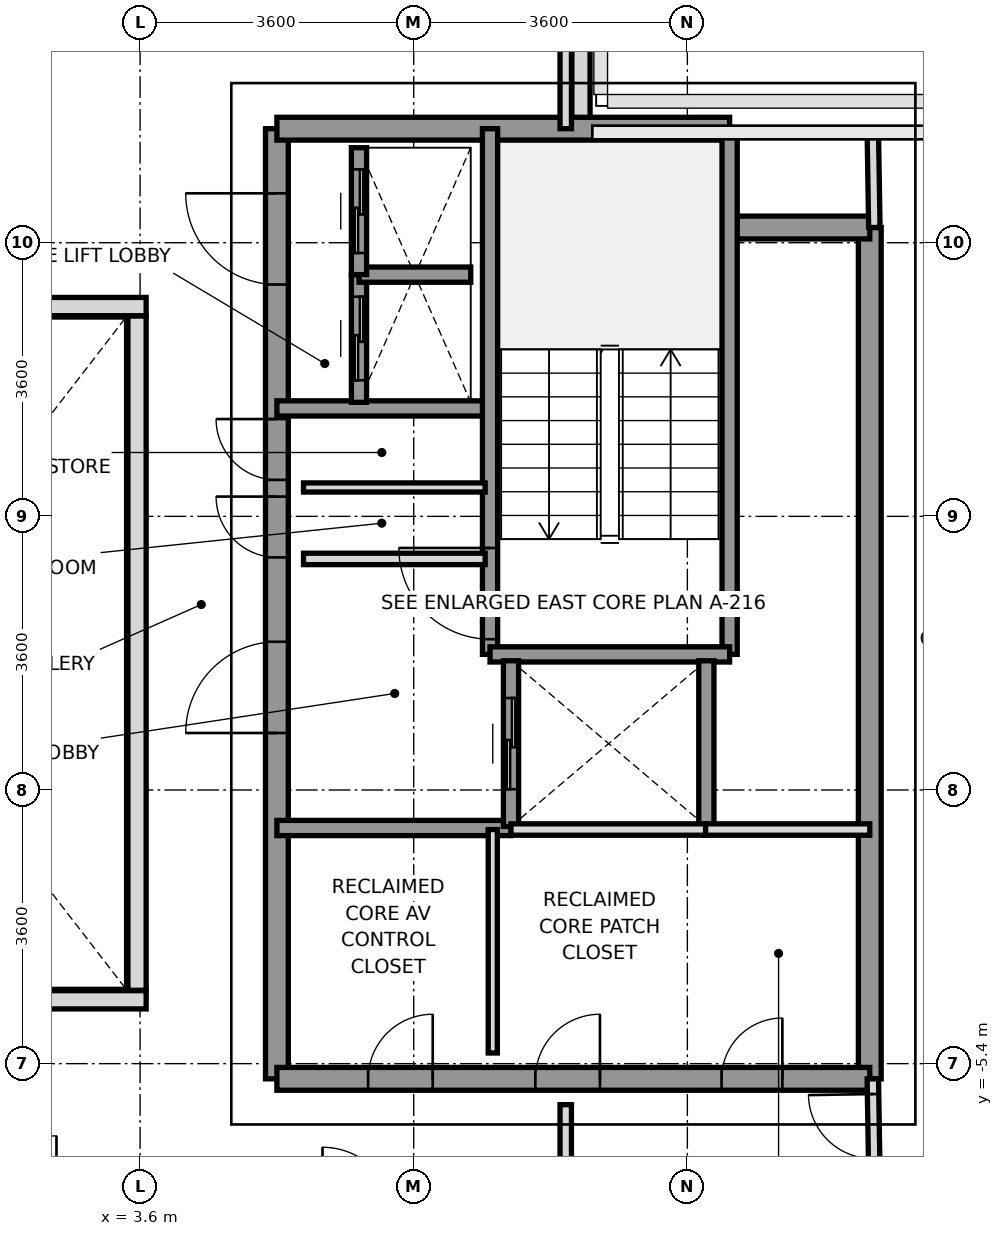
"""IFC4 building model, lengths in metres.
Left out: names, types, materials, properties, quantities, classifications, styles, units other than length and angle.
Written with IfcOpenShell. Run it as: python <this file> out.ifc"""

import sys

from ifc_helpers import new_model, si_unit, direction, frame, frame_2d, origin, place, context, subcontext, project, spatial, rectangle, extrude, source, transform, mapped, element, fill, save


model = new_model("IFC4")
c1 = context("Model", 3, precision=1e-05, world=origin(), true_north=direction((0.0, 1.0)))
c2 = subcontext(c1, "Body", "Model", "MODEL_VIEW")
j1 = project(units=[si_unit("LENGTHUNIT", "METRE"), si_unit("PLANEANGLEUNIT", "RADIAN")], contexts=[c1])
p1 = place(None, origin())
s1 = spatial("IfcSite", under=j1, at=p1, CompositionType="ELEMENT")
p2 = place(p1, origin())
s2 = spatial("IfcBuilding", under=s1, at=p2, CompositionType="ELEMENT")
p3 = place(p2, frame((0.0, 0.0, 230.0)))
s3 = spatial("IfcBuildingStorey", under=s2, at=p3, CompositionType="ELEMENT", Elevation=230.0)
p4 = place(p3, frame((9.4, 8.622, 0.0), z_axis=(0.0, 0.0, 1.0), x_axis=(0.0, -1.0, 0.0)))
e1 = element("IfcWall", 1, at=p4, inside=s3, PredefinedType="PARAPET", context=c2, shape_type="SweptSolid", body=[
    extrude(rectangle(XDim=1.669, YDim=0.24, at=frame_2d((0.834, 0.0))), origin(), (0.0, 0.0, 1.0), 1.15),
])
p5 = place(p3, frame((13.2, -5.6, 0.0), z_axis=(0.0, 0.0, 1.0), x_axis=(0.0, 1.0, 0.0)))
e2 = element("IfcWall", 2, at=p5, inside=s3, PredefinedType="SHEAR", context=c2, shape_type="SweptSolid", body=[
    extrude(rectangle(XDim=11.2, YDim=0.3, at=frame_2d((5.6, 0.0))), origin(), (0.0, 0.0, 1.0), 3.01),
])
p6 = place(p3, frame((5.4, -5.6, 0.0), z_axis=(0.0, 0.0, 1.0), x_axis=(0.0, 1.0, 0.0)))
e3 = element("IfcWall", 3, at=p6, inside=s3, PredefinedType="SHEAR", context=c2, shape_type="SweptSolid", body=[
    extrude(rectangle(XDim=12.5, YDim=0.3, at=frame_2d((6.25, 0.0))), origin(), (0.0, 0.0, 1.0), 3.01),
])
p7 = place(p6, frame((4.55, 0.0, 0.0)))
e4 = element("IfcOpeningElement", 4, at=p7, cuts=e3, PredefinedType="OPENING", context=c2, shape_type="SweptSolid", body=[
    extrude(rectangle(XDim=1.2, YDim=2.2, at=frame_2d((0.6, 1.1))), frame((0.0, 0.16, 0.0), z_axis=(0.0, -1.0, 0.0), x_axis=(1.0, 0.0, 0.0)), (0.0, 0.0, 1.0), 0.32),
])
p8 = place(p6, frame((10.45, 0.0, 0.0)))
e5 = element("IfcOpeningElement", 5, at=p8, cuts=e3, PredefinedType="OPENING", context=c2, shape_type="SweptSolid", body=[
    extrude(rectangle(XDim=1.2, YDim=2.2, at=frame_2d((0.6, 1.1))), frame((0.0, 0.16, 0.0), z_axis=(0.0, -1.0, 0.0), x_axis=(1.0, 0.0, 0.0)), (0.0, 0.0, 1.0), 0.32),
])
p9 = place(p6, frame((6.86, 0.0, 0.0)))
e6 = element("IfcOpeningElement", 6, at=p9, cuts=e3, PredefinedType="OPENING", context=c2, shape_type="SweptSolid", body=[
    extrude(rectangle(XDim=0.8, YDim=2.1, at=frame_2d((0.4, 1.05))), frame((0.0, 0.16, 0.0), z_axis=(0.0, -1.0, 0.0), x_axis=(1.0, 0.0, 0.0)), (0.0, 0.0, 1.0), 0.32),
])
p10 = place(p6, frame((7.88, 0.0, 0.0)))
e7 = element("IfcOpeningElement", 7, at=p10, cuts=e3, PredefinedType="OPENING", context=c2, shape_type="SweptSolid", body=[
    extrude(rectangle(XDim=0.8, YDim=2.1, at=frame_2d((0.4, 1.05))), frame((0.0, 0.16, 0.0), z_axis=(0.0, -1.0, 0.0), x_axis=(1.0, 0.0, 0.0)), (0.0, 0.0, 1.0), 0.32),
])
p11 = place(p3, frame((5.4, 6.9, 0.0), z_axis=(0.0, 0.0, 1.0), x_axis=(1.0, 0.0, 0.0)))
e8 = element("IfcWall", 8, at=p11, inside=s3, PredefinedType="SHEAR", context=c2, shape_type="SweptSolid", body=[
    extrude(rectangle(XDim=5.956, YDim=0.3, at=frame_2d((2.978, 0.0))), origin(), (0.0, 0.0, 1.0), 3.01),
])
p12 = place(p3, frame((11.356, 5.6, 0.0), z_axis=(0.0, 0.0, 1.0), x_axis=(1.0, 0.0, 0.0)))
e9 = element("IfcWall", 9, at=p12, inside=s3, PredefinedType="SHEAR", context=c2, shape_type="SweptSolid", body=[
    extrude(rectangle(XDim=1.844, YDim=0.3, at=frame_2d((0.922, 0.0))), origin(), (0.0, 0.0, 1.0), 3.01),
])
p13 = place(p3, frame((5.4, -5.6, 0.0), z_axis=(0.0, 0.0, 1.0), x_axis=(1.0, 0.0, 0.0)))
e10 = element("IfcWall", 10, at=p13, inside=s3, PredefinedType="SHEAR", context=c2, shape_type="SweptSolid", body=[
    extrude(rectangle(XDim=7.8, YDim=0.3, at=frame_2d((3.9, 0.0))), origin(), (0.0, 0.0, 1.0), 3.01),
])
p14 = place(p13, frame((5.85, 0.0, 0.0)))
e11 = element("IfcOpeningElement", 11, at=p14, cuts=e10, PredefinedType="OPENING", context=c2, shape_type="SweptSolid", body=[
    extrude(rectangle(XDim=0.8, YDim=2.1, at=frame_2d((0.4, 1.05))), frame((0.0, 0.16, 0.0), z_axis=(0.0, -1.0, 0.0), x_axis=(1.0, 0.0, 0.0)), (0.0, 0.0, 1.0), 0.32),
])
p15 = place(p13, frame((1.2, 0.0, 0.0)))
e12 = element("IfcOpeningElement", 12, at=p15, cuts=e10, PredefinedType="OPENING", context=c2, shape_type="SweptSolid", body=[
    extrude(rectangle(XDim=0.85, YDim=2.1, at=frame_2d((0.425, 1.05))), frame((0.0, 0.16, 0.0), z_axis=(0.0, -1.0, 0.0), x_axis=(1.0, 0.0, 0.0)), (0.0, 0.0, 1.0), 0.32),
])
p16 = place(p13, frame((3.4, 0.0, 0.0)))
e13 = element("IfcOpeningElement", 13, at=p16, cuts=e10, PredefinedType="OPENING", context=c2, shape_type="SweptSolid", body=[
    extrude(rectangle(XDim=0.85, YDim=2.1, at=frame_2d((0.425, 1.05))), frame((0.0, 0.16, 0.0), z_axis=(0.0, -1.0, 0.0), x_axis=(1.0, 0.0, 0.0)), (0.0, 0.0, 1.0), 0.32),
])
p17 = place(p3, frame((5.4, 3.22, 0.0), z_axis=(0.0, 0.0, 1.0), x_axis=(1.0, 0.0, 0.0)))
e14 = element("IfcWall", 14, at=p17, inside=s3, PredefinedType="SOLIDWALL", context=c2, shape_type="SweptSolid", body=[
    extrude(rectangle(XDim=2.78, YDim=0.2, at=frame_2d((1.39, 0.0))), origin(), (0.0, 0.0, 1.0), 3.01),
])
p18 = place(p3, frame((5.4, -2.3, 0.0), z_axis=(0.0, 0.0, 1.0), x_axis=(1.0, 0.0, 0.0)))
e15 = element("IfcWall", 15, at=p18, inside=s3, PredefinedType="SOLIDWALL", context=c2, shape_type="SweptSolid", body=[
    extrude(rectangle(XDim=3.08, YDim=0.2, at=frame_2d((1.54, 0.0))), origin(), (0.0, 0.0, 1.0), 3.01),
])
p19 = place(p3, frame((8.204, -0.016, 0.0), z_axis=(0.0, 0.0, 1.0), x_axis=(0.0, 1.0, 0.0)))
e16 = element("IfcWall", 16, at=p19, inside=s3, PredefinedType="SOLIDWALL", context=c2, shape_type="SweptSolid", body=[
    extrude(rectangle(XDim=6.916, YDim=0.2, at=frame_2d((3.458, 0.0))), origin(), (0.0, 0.0, 1.0), 3.01),
])
p20 = place(p19, frame((0.2, 0.0, 0.0)))
e17 = element("IfcOpeningElement", 17, at=p20, cuts=e16, PredefinedType="OPENING", context=c2, shape_type="SweptSolid", body=[
    extrude(rectangle(XDim=1.2, YDim=2.2, at=frame_2d((0.6, 1.1))), frame((0.0, 0.11, 0.0), z_axis=(0.0, -1.0, 0.0), x_axis=(1.0, 0.0, 0.0)), (0.0, 0.0, 1.0), 0.22),
])
p21 = place(p3, frame((11.356, -0.016, 0.0), z_axis=(0.0, 0.0, 1.0), x_axis=(0.0, 1.0, 0.0)))
e18 = element("IfcWall", 18, at=p21, inside=s3, PredefinedType="SOLIDWALL", context=c2, shape_type="SweptSolid", body=[
    extrude(rectangle(XDim=6.916, YDim=0.2, at=frame_2d((3.458, 0.0))), origin(), (0.0, 0.0, 1.0), 3.01),
])
p22 = place(p3, frame((8.204, -0.016, 0.0), z_axis=(0.0, 0.0, 1.0), x_axis=(1.0, 0.0, 0.0)))
e19 = element("IfcWall", 19, at=p22, inside=s3, PredefinedType="SOLIDWALL", context=c2, shape_type="SweptSolid", body=[
    extrude(rectangle(XDim=3.152, YDim=0.2, at=frame_2d((1.576, 0.0))), origin(), (0.0, 0.0, 1.0), 3.01),
])
p23 = place(p3, frame((8.48, -2.28, 0.0), z_axis=(0.0, 0.0, 1.0), x_axis=(0.0, 1.0, 0.0)))
e20 = element("IfcWall", 20, at=p23, inside=s3, PredefinedType="SOLIDWALL", context=c2, shape_type="SweptSolid", body=[
    extrude(rectangle(XDim=2.18, YDim=0.2, at=frame_2d((1.09, 0.0))), origin(), (0.0, 0.0, 1.0), 3.01),
])
p24 = place(p23, frame((0.49, 0.0, 0.0)))
e21 = element("IfcOpeningElement", 21, at=p24, cuts=e20, PredefinedType="OPENING", context=c2, shape_type="SweptSolid", body=[
    extrude(rectangle(XDim=1.2, YDim=2.2, at=frame_2d((0.6, 1.1))), frame((0.0, 0.11, 0.0), z_axis=(0.0, -1.0, 0.0), x_axis=(1.0, 0.0, 0.0)), (0.0, 0.0, 1.0), 0.22),
])
p25 = place(p3, frame((11.05, -2.28, 0.0), z_axis=(0.0, 0.0, 1.0), x_axis=(0.0, 1.0, 0.0)))
e22 = element("IfcWall", 22, at=p25, inside=s3, PredefinedType="SOLIDWALL", context=c2, shape_type="SweptSolid", body=[
    extrude(rectangle(XDim=2.18, YDim=0.2, at=frame_2d((1.09, 0.0))), origin(), (0.0, 0.0, 1.0), 3.01),
])
p26 = place(p3, frame((6.48, 3.3, 0.0), z_axis=(0.0, 0.0, 1.0), x_axis=(0.0, 1.0, 0.0)))
e23 = element("IfcWall", 23, at=p26, inside=s3, PredefinedType="SOLIDWALL", context=c2, shape_type="SweptSolid", body=[
    extrude(rectangle(XDim=1.68, YDim=0.2, at=frame_2d((0.84, 0.0))), origin(), (0.0, 0.0, 1.0), 3.01),
])
p27 = place(p26, frame((0.29, 0.0, 0.0)))
e24 = element("IfcOpeningElement", 24, at=p27, cuts=e23, PredefinedType="OPENING", context=c2, shape_type="SweptSolid", body=[
    extrude(rectangle(XDim=1.1, YDim=2.2, at=frame_2d((0.55, 1.1))), frame((0.0, 0.11, 0.0), z_axis=(0.0, -1.0, 0.0), x_axis=(1.0, 0.0, 0.0)), (0.0, 0.0, 1.0), 0.22),
])
p28 = place(p3, frame((6.48, 4.98, 0.0), z_axis=(0.0, 0.0, 1.0), x_axis=(1.0, 0.0, 0.0)))
e25 = element("IfcWall", 25, at=p28, inside=s3, PredefinedType="SOLIDWALL", context=c2, shape_type="SweptSolid", body=[
    extrude(rectangle(XDim=1.47, YDim=0.2, at=frame_2d((0.735, 0.0))), origin(), (0.0, 0.0, 1.0), 3.01),
])
p29 = place(p3, frame((6.48, 4.98, 0.0), z_axis=(0.0, 0.0, 1.0), x_axis=(0.0, 1.0, 0.0)))
e26 = element("IfcWall", 26, at=p29, inside=s3, PredefinedType="SOLIDWALL", context=c2, shape_type="SweptSolid", body=[
    extrude(rectangle(XDim=1.67, YDim=0.2, at=frame_2d((0.835, 0.0))), origin(), (0.0, 0.0, 1.0), 3.01),
])
p30 = place(p29, frame((0.285, 0.0, 0.0)))
e27 = element("IfcOpeningElement", 27, at=p30, cuts=e26, PredefinedType="OPENING", context=c2, shape_type="SweptSolid", body=[
    extrude(rectangle(XDim=1.1, YDim=2.2, at=frame_2d((0.55, 1.1))), frame((0.0, 0.11, 0.0), z_axis=(0.0, -1.0, 0.0), x_axis=(1.0, 0.0, 0.0)), (0.0, 0.0, 1.0), 0.22),
])
p31 = place(p3, frame((5.75, 1.24, 0.0), z_axis=(0.0, 0.0, 1.0), x_axis=(1.0, 0.0, 0.0)))
e28 = element("IfcWall", 28, at=p31, inside=s3, PredefinedType="PARTITIONING", context=c2, shape_type="SweptSolid", body=[
    extrude(rectangle(XDim=2.39, YDim=0.15, at=frame_2d((1.195, 0.0))), origin(), (0.0, 0.0, 1.0), 3.01),
])
p32 = place(p3, frame((5.75, 2.18, 0.0), z_axis=(0.0, 0.0, 1.0), x_axis=(1.0, 0.0, 0.0)))
e29 = element("IfcWall", 29, at=p32, inside=s3, PredefinedType="PARTITIONING", context=c2, shape_type="SweptSolid", body=[
    extrude(rectangle(XDim=2.39, YDim=0.12, at=frame_2d((1.195, 0.0))), origin(), (0.0, 0.0, 1.0), 3.01),
])
p33 = place(p3, frame((11.02, -2.32, 0.0), z_axis=(0.0, 0.0, 1.0), x_axis=(1.0, 0.0, 0.0)))
e30 = element("IfcWall", 30, at=p33, inside=s3, PredefinedType="PARTITIONING", context=c2, shape_type="SweptSolid", body=[
    extrude(rectangle(XDim=2.18, YDim=0.15, at=frame_2d((1.09, 0.0))), origin(), (0.0, 0.0, 1.0), 3.01),
])
p34 = place(p3, frame((8.24, -5.26, 0.0), z_axis=(0.0, 0.0, 1.0), x_axis=(0.0, 1.0, 0.0)))
e31 = element("IfcWall", 31, at=p34, inside=s3, PredefinedType="PARTITIONING", context=c2, shape_type="SweptSolid", body=[
    extrude(rectangle(XDim=2.94, YDim=0.12, at=frame_2d((1.47, 0.0))), origin(), (0.0, 0.0, 1.0), 3.01),
])
p35 = place(p3, frame((8.48, -2.32, 0.0), z_axis=(0.0, 0.0, 1.0), x_axis=(1.0, 0.0, 0.0)))
e32 = element("IfcWall", 32, at=p35, inside=s3, PredefinedType="PARTITIONING", context=c2, shape_type="SweptSolid", body=[
    extrude(rectangle(XDim=2.56, YDim=0.15, at=frame_2d((1.28, 0.0))), origin(), (0.0, 0.0, 1.0), 3.01),
])
p36 = place(p3, frame((9.2, 6.9, 0.0), z_axis=(0.0, 0.0, 1.0), x_axis=(0.0, 1.0, 0.0)))
e33 = element("IfcWall", 33, at=p36, inside=s3, PredefinedType="PARTITIONING", context=c2, shape_type="SweptSolid", body=[
    extrude(rectangle(XDim=3.38, YDim=0.15, at=frame_2d((1.69, 0.0))), origin(), (0.0, 0.0, 1.0), 2.61),
])
p37 = place(p3, frame((9.2, -10.28, 0.0), z_axis=(0.0, 0.0, 1.0), x_axis=(0.0, 1.0, 0.0)))
e34 = element("IfcWall", 34, at=p37, inside=s3, PredefinedType="PARTITIONING", context=c2, shape_type="SweptSolid", body=[
    extrude(rectangle(XDim=4.34, YDim=0.15, at=frame_2d((2.17, 0.0))), origin(), (0.0, 0.0, 1.0), 2.61),
])
p38 = place(p3, frame((13.26, 5.6, 0.0), z_axis=(0.0, 0.0, 1.0), x_axis=(-0.016013571389, 0.999871774545, 0.0)))
e35 = element("IfcWall", 35, at=p38, inside=s3, PredefinedType="PARTITIONING", context=c2, shape_type="SweptSolid", body=[
    extrude(rectangle(XDim=1.25, YDim=0.15, at=frame_2d((0.625, 0.0))), origin(), (0.0, 0.0, 1.0), 3.01),
])
p39 = place(p3, frame((13.26, -6.85, 0.0), z_axis=(0.0, 0.0, 1.0), x_axis=(-0.016013571389, 0.999871774545, 0.0)))
e36 = element("IfcWall", 36, at=p39, inside=s3, PredefinedType="PARTITIONING", context=c2, shape_type="SweptSolid", body=[
    extrude(rectangle(XDim=1.25, YDim=0.15, at=frame_2d((0.625, 0.0))), origin(), (0.0, 0.0, 1.0), 3.01),
])
p40 = place(p39, frame((0.2, 0.0, 0.0)))
e37 = element("IfcOpeningElement", 37, at=p40, cuts=e36, PredefinedType="OPENING", context=c2, shape_type="SweptSolid", body=[
    extrude(rectangle(XDim=0.85, YDim=2.1, at=frame_2d((0.425, 1.05))), frame((0.0, 0.085, 0.0), z_axis=(0.0, -1.0, 0.0), x_axis=(1.0, 0.0, 0.0)), (0.0, 0.0, 1.0), 0.17),
])
for number, where, z_axis, x_axis in (
    (38, (-3.68, -4.56, 0.0), (0.0, 0.0, 1.0), (1.0, 0.0, 0.0)),
    (39, (-3.68, 4.56, 0.0), (0.0, 0.0, 1.0), (1.0, 0.0, 0.0)),
):
    element("IfcWall", number, at=place(p3, frame(where, z_axis=z_axis, x_axis=x_axis)), inside=s3, PredefinedType="PARAPET", context=c2, shape_type="SweptSolid", body=[
        extrude(rectangle(XDim=7.36, YDim=0.24, at=frame_2d((3.68, 0.0))), origin(), (0.0, 0.0, 1.0), 1.15),
    ])
p41 = place(p3, frame((3.56, -4.435, 0.0), z_axis=(0.0, 0.0, 1.0), x_axis=(0.0, 1.0, 0.0)))
e40 = element("IfcWall", 40, at=p41, inside=s3, PredefinedType="PARAPET", context=c2, shape_type="SweptSolid", body=[
    extrude(rectangle(XDim=8.87, YDim=0.24, at=frame_2d((4.435, 0.0))), origin(), (0.0, 0.0, 1.0), 1.15),
])
m1 = source(origin(), c2, "Body", "SweptSolid", [
    extrude(rectangle(XDim=1.2, YDim=2.2, at=frame_2d((0.6, 1.1))), frame((0.0, 0.025, 0.0), z_axis=(0.0, -1.0, 0.0), x_axis=(1.0, 0.0, 0.0)), (0.0, 0.0, 1.0), 0.05),
])
p42 = place(p20, origin())
e41 = element("IfcDoor", 41, at=p42, inside=s3, OperationType="SINGLE_SWING_RIGHT", PredefinedType="DOOR", context=c2, shape_type="MappedRepresentation", body=[
    mapped(m1, transform((0.0, 0.0, 0.0), x_axis=(1.0, 0.0, 0.0), y_axis=(0.0, 1.0, 0.0), z_axis=(0.0, 0.0, 1.0), scale=1.0)),
])
fill(e17, e41)
p43 = place(p7, origin())
e42 = element("IfcDoor", 42, at=p43, inside=s3, OperationType="SINGLE_SWING_LEFT", PredefinedType="DOOR", context=c2, shape_type="MappedRepresentation", body=[
    mapped(m1, transform((0.0, 0.0, 0.0), x_axis=(1.0, 0.0, 0.0), y_axis=(0.0, 1.0, 0.0), z_axis=(0.0, 0.0, 1.0), scale=1.0)),
])
fill(e4, e42)
p44 = place(p8, origin())
e43 = element("IfcDoor", 43, at=p44, inside=s3, OperationType="SINGLE_SWING_RIGHT", PredefinedType="DOOR", context=c2, shape_type="MappedRepresentation", body=[
    mapped(m1, transform((0.0, 0.0, 0.0), x_axis=(1.0, 0.0, 0.0), y_axis=(0.0, 1.0, 0.0), z_axis=(0.0, 0.0, 1.0), scale=1.0)),
])
fill(e5, e43)
m2 = source(origin(), c2, "Body", "SweptSolid", [
    extrude(rectangle(XDim=0.8, YDim=2.1, at=frame_2d((0.4, 1.05))), frame((0.0, 0.025, 0.0), z_axis=(0.0, -1.0, 0.0), x_axis=(1.0, 0.0, 0.0)), (0.0, 0.0, 1.0), 0.05),
])
p45 = place(p9, origin())
e44 = element("IfcDoor", 44, at=p45, inside=s3, OperationType="SINGLE_SWING_RIGHT", PredefinedType="DOOR", context=c2, shape_type="MappedRepresentation", body=[
    mapped(m2, transform((0.0, 0.0, 0.0), x_axis=(1.0, 0.0, 0.0), y_axis=(0.0, 1.0, 0.0), z_axis=(0.0, 0.0, 1.0), scale=1.0)),
])
fill(e6, e44)
p46 = place(p10, origin())
e45 = element("IfcDoor", 45, at=p46, inside=s3, OperationType="SINGLE_SWING_RIGHT", PredefinedType="DOOR", context=c2, shape_type="MappedRepresentation", body=[
    mapped(m2, transform((0.0, 0.0, 0.0), x_axis=(1.0, 0.0, 0.0), y_axis=(0.0, 1.0, 0.0), z_axis=(0.0, 0.0, 1.0), scale=1.0)),
])
fill(e7, e45)
p47 = place(p14, origin())
e46 = element("IfcDoor", 46, at=p47, inside=s3, OperationType="SINGLE_SWING_RIGHT", PredefinedType="DOOR", context=c2, shape_type="MappedRepresentation", body=[
    mapped(m2, transform((0.0, 0.0, 0.0), x_axis=(1.0, 0.0, 0.0), y_axis=(0.0, 1.0, 0.0), z_axis=(0.0, 0.0, 1.0), scale=1.0)),
])
fill(e11, e46)
m3 = source(origin(), c2, "Body", "SweptSolid", [
    extrude(rectangle(XDim=0.85, YDim=2.1, at=frame_2d((0.425, 1.05))), frame((0.0, 0.025, 0.0), z_axis=(0.0, -1.0, 0.0), x_axis=(1.0, 0.0, 0.0)), (0.0, 0.0, 1.0), 0.05),
])
p48 = place(p15, origin())
e47 = element("IfcDoor", 47, at=p48, inside=s3, OperationType="SINGLE_SWING_RIGHT", PredefinedType="DOOR", context=c2, shape_type="MappedRepresentation", body=[
    mapped(m3, transform((0.0, 0.0, 0.0), x_axis=(1.0, 0.0, 0.0), y_axis=(0.0, 1.0, 0.0), z_axis=(0.0, 0.0, 1.0), scale=1.0)),
])
fill(e12, e47)
p49 = place(p16, origin())
e48 = element("IfcDoor", 48, at=p49, inside=s3, OperationType="SINGLE_SWING_RIGHT", PredefinedType="DOOR", context=c2, shape_type="MappedRepresentation", body=[
    mapped(m3, transform((0.0, 0.0, 0.0), x_axis=(1.0, 0.0, 0.0), y_axis=(0.0, 1.0, 0.0), z_axis=(0.0, 0.0, 1.0), scale=1.0)),
])
fill(e13, e48)
p50 = place(p24, origin())
e49 = element("IfcDoor", 49, at=p50, inside=s3, OperationType="SLIDING_TO_RIGHT", PredefinedType="DOOR", context=c2, shape_type="MappedRepresentation", body=[
    mapped(m1, transform((0.0, 0.0, 0.0), x_axis=(1.0, 0.0, 0.0), y_axis=(0.0, 1.0, 0.0), z_axis=(0.0, 0.0, 1.0), scale=1.0)),
])
fill(e21, e49)
m4 = source(origin(), c2, "Body", "SweptSolid", [
    extrude(rectangle(XDim=1.1, YDim=2.2, at=frame_2d((0.55, 1.1))), frame((0.0, 0.025, 0.0), z_axis=(0.0, -1.0, 0.0), x_axis=(1.0, 0.0, 0.0)), (0.0, 0.0, 1.0), 0.05),
])
p51 = place(p27, origin())
e50 = element("IfcDoor", 50, at=p51, inside=s3, OperationType="SLIDING_TO_LEFT", PredefinedType="DOOR", context=c2, shape_type="MappedRepresentation", body=[
    mapped(m4, transform((0.0, 0.0, 0.0), x_axis=(1.0, 0.0, 0.0), y_axis=(0.0, 1.0, 0.0), z_axis=(0.0, 0.0, 1.0), scale=1.0)),
])
fill(e24, e50)
p52 = place(p30, origin())
e51 = element("IfcDoor", 51, at=p52, inside=s3, OperationType="SLIDING_TO_LEFT", PredefinedType="DOOR", context=c2, shape_type="MappedRepresentation", body=[
    mapped(m4, transform((0.0, 0.0, 0.0), x_axis=(1.0, 0.0, 0.0), y_axis=(0.0, 1.0, 0.0), z_axis=(0.0, 0.0, 1.0), scale=1.0)),
])
fill(e27, e51)
p53 = place(p40, origin())
e52 = element("IfcDoor", 52, at=p53, inside=s3, OperationType="SINGLE_SWING_RIGHT", PredefinedType="DOOR", context=c2, shape_type="MappedRepresentation", body=[
    mapped(m3, transform((0.0, 0.0, 0.0), x_axis=(1.0, 0.0, 0.0), y_axis=(0.0, 1.0, 0.0), z_axis=(0.0, 0.0, 1.0), scale=1.0)),
])
fill(e37, e52)
save(model, sys.argv[1])
